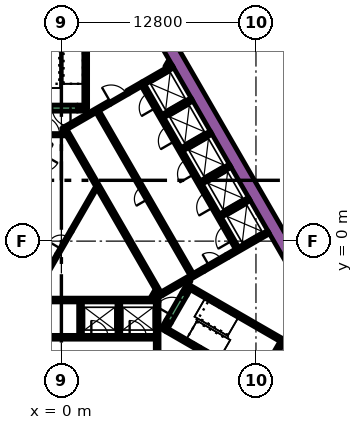
"""IFC4 building model, lengths in metres.
Left out: names, types, materials, properties, quantities, classifications, styles, units other than length and angle.
Written with IfcOpenShell. Run it as: python <this file> out.ifc"""

import sys

from ifc_helpers import new_model, si_unit, direction, frame, frame_2d, origin, place, context, subcontext, project, spatial, polyline, rectangle, outline, extrude, element, fill, save


model = new_model("IFC4")
c1 = context("Model", 3, precision=1e-05, world=origin(), true_north=direction((0.0, 1.0)))
c2 = subcontext(c1, "Body", "Model", "MODEL_VIEW")
j1 = project(units=[si_unit("LENGTHUNIT", "METRE"), si_unit("PLANEANGLEUNIT", "RADIAN")], contexts=[c1])
p1 = place(None, origin())
s1 = spatial("IfcSite", under=j1, at=p1, CompositionType="ELEMENT")
p2 = place(p1, origin())
s2 = spatial("IfcBuilding", under=s1, at=p2, CompositionType="ELEMENT")
p3 = place(p2, origin())
s3 = spatial("IfcBuildingStorey", under=s2, at=p3, CompositionType="ELEMENT", Elevation=0.0)
p4 = place(p3, frame((6.776, 13.364, -1.8), z_axis=(0.0, 0.0, 1.0), x_axis=(0.500004177138, -0.8660229921, 0.0)))
e1 = element("IfcWall", 1, at=p4, inside=s3, PredefinedType="SOLIDWALL", context=c2, shape_type="SweptSolid", body=[
    extrude(rectangle(XDim=20.204, YDim=0.9, at=frame_2d((10.102, 0.0))), origin(), (0.0, 0.0, 1.0), 7.8),
])
p5 = place(p3, frame((11.695, -12.644, -1.8), z_axis=(0.0, 0.0, 1.0), x_axis=(0.500010229568, 0.86601949766, 0.0)))
e2 = element("IfcWall", 2, at=p5, inside=s3, PredefinedType="SOLIDWALL", context=c2, shape_type="SweptSolid", body=[
    extrude(rectangle(XDim=9.326, YDim=0.9, at=frame_2d((4.663, 0.0))), origin(), (0.0, 0.0, 1.0), 7.8),
])
p6 = place(p3, frame((12.885, -9.431, 0.0), z_axis=(0.0, 0.0, 1.0), x_axis=(0.500020560727, 0.866013532718, 0.0)))
e3 = element("IfcWall", 3, at=p6, inside=s3, PredefinedType="SOLIDWALL", context=c2, shape_type="SweptSolid", body=[
    extrude(rectangle(XDim=3.45, YDim=0.25, at=frame_2d((1.725, 0.0))), origin(), (0.0, 0.0, 1.0), 6.0),
])
p7 = place(p3, frame((12.84, -9.261, 0.0), z_axis=(0.0, 0.0, 1.0), x_axis=(-0.866013990052, 0.500019768644, 0.0)))
e4 = element("IfcWall", 4, at=p7, inside=s3, PredefinedType="SOLIDWALL", context=c2, shape_type="SweptSolid", body=[
    extrude(rectangle(XDim=6.8, YDim=0.25, at=frame_2d((3.4, 0.0))), origin(), (0.0, 0.0, 1.0), 6.0),
])
p8 = place(p3, frame((6.78, -5.906, 0.0), z_axis=(0.0, 0.0, 1.0), x_axis=(0.500223362819, 0.865896406789, 0.0)))
e5 = element("IfcWall", 5, at=p8, inside=s3, PredefinedType="SOLIDWALL", context=c2, shape_type="SweptSolid", body=[
    extrude(rectangle(XDim=0.675, YDim=0.25, at=frame_2d((0.337, 0.0))), origin(), (0.0, 0.0, 1.0), 6.0),
])
p9 = place(p3, frame((8.334, -2.964, 0.0), z_axis=(0.0, 0.0, 1.0), x_axis=(0.866016039709, -0.500016218704, 0.0)))
e6 = element("IfcWall", 6, at=p9, inside=s3, PredefinedType="SOLIDWALL", context=c2, shape_type="SweptSolid", body=[
    extrude(rectangle(XDim=7.05, YDim=0.25, at=frame_2d((3.525, 0.0))), origin(), (0.0, 0.0, 1.0), 6.0),
])
p10 = place(p3, frame((8.168, -3.503, 0.0), z_axis=(0.0, 0.0, 1.0), x_axis=(0.49972245349, 0.866185586049, 0.0)))
e7 = element("IfcWall", 7, at=p10, inside=s3, PredefinedType="SOLIDWALL", context=c2, shape_type="SweptSolid", body=[
    extrude(rectangle(XDim=0.425, YDim=0.25, at=frame_2d((0.212, 0.0))), origin(), (0.0, 0.0, 1.0), 6.0),
])
p11 = place(p3, frame((1.6, 8.95, 0.0), z_axis=(0.0, 0.0, 1.0), x_axis=(0.0, 1.0, 0.0)))
e8 = element("IfcWall", 8, at=p11, inside=s3, PredefinedType="SOLIDWALL", context=c2, shape_type="SweptSolid", body=[
    extrude(rectangle(XDim=6.8, YDim=0.25, at=frame_2d((3.4, 0.0))), origin(), (0.0, 0.0, 1.0), 6.0),
])
p12 = place(p3, frame((1.05, 8.825, 0.0), z_axis=(0.0, 0.0, 1.0), x_axis=(1.0, 0.0, 0.0)))
e9 = element("IfcWall", 9, at=p12, inside=s3, PredefinedType="SOLIDWALL", context=c2, shape_type="SweptSolid", body=[
    extrude(rectangle(XDim=0.675, YDim=0.25, at=frame_2d((0.337, 0.0))), origin(), (0.0, 0.0, 1.0), 6.0),
])
p13 = place(p3, frame((-5.845, -3.875, -1.8), z_axis=(0.0, 0.0, 1.0), x_axis=(1.0, 0.0, 0.0)))
e10 = element("IfcWall", 10, at=p13, inside=s3, PredefinedType="SOLIDWALL", context=c2, shape_type="SweptSolid", body=[
    extrude(rectangle(XDim=12.27, YDim=0.25, at=frame_2d((6.135, 0.0))), origin(), (0.0, 0.0, 1.0), 7.8),
])
p14 = place(p3, frame((6.3, -7.268, -1.8), z_axis=(0.0, 0.0, 1.0), x_axis=(0.0, 1.0, 0.0)))
e11 = element("IfcWall", 11, at=p14, inside=s3, PredefinedType="SOLIDWALL", context=c2, shape_type="SweptSolid", body=[
    extrude(rectangle(XDim=3.268, YDim=0.25, at=frame_2d((1.634, 0.0))), origin(), (0.0, 0.0, 1.0), 7.8),
])
for number, where, z_axis, x_axis in (
    (12, (3.78, -4.0, -1.8), (0.0, 0.0, 1.0), (0.0, -1.0, 0.0)),
    (13, (1.26, -4.0, -1.8), (0.0, 0.0, 1.0), (0.0, -1.0, 0.0)),
    (14, (10.464, 1.677, -1.8), (0.0, 0.0, 1.0), (0.866, 0.5, 0.0)),
):
    element("IfcWall", number, at=place(p3, frame(where, z_axis=z_axis, x_axis=x_axis)), inside=s3, PredefinedType="SOLIDWALL", context=c2, shape_type="SweptSolid", body=[
        extrude(rectangle(XDim=2.2, YDim=0.25, at=frame_2d((1.1, 0.0))), origin(), (0.0, 0.0, 1.0), 7.8),
    ])
p15 = place(p3, frame((13.629, 0.594, -1.8), z_axis=(0.0, 0.0, 1.0), x_axis=(-0.86602790099, -0.499995674689, 0.0)))
e15 = element("IfcWall", 15, at=p15, inside=s3, PredefinedType="SOLIDWALL", context=c2, shape_type="SweptSolid", body=[
    extrude(rectangle(XDim=3.146, YDim=0.25, at=frame_2d((1.573, 0.0))), origin(), (0.0, 0.0, 1.0), 7.8),
])
p16 = place(p3, frame((0.0, 0.0, -1.8)))
e16 = element("IfcWall", 16, at=p16, inside=s3, PredefinedType="SOLIDWALL", context=c2, shape_type="SweptSolid", body=[
    extrude(outline(polyline([(0.335, 6.925), (0.335, 7.075), (0.335, 7.075), (0.335, 7.075), (0.245, 7.075), (0.079, 7.363), (0.035, 7.439), (0.252, 7.564), (0.377, 7.348), (6.552, -3.348), (6.677, -3.564), (6.46, -3.689), (4.897, -0.981), (0.332, 6.925), (0.335, 6.925), (0.335, 6.925), (0.335, 6.925)])), origin(), (0.0, 0.0, 1.0), 7.8),
])
p17 = place(p3, frame((4.358, 9.791, -1.8), z_axis=(0.0, 0.0, 1.0), x_axis=(0.866079547155, 0.499906209203, 0.0)))
e17 = element("IfcWall", 17, at=p17, inside=s3, PredefinedType="SOLIDWALL", context=c2, shape_type="SweptSolid", body=[
    extrude(rectangle(XDim=1.15, YDim=0.25, at=frame_2d((0.575, 0.0))), origin(), (0.0, 0.0, 1.0), 7.8),
])
p18 = place(p3, frame((5.356, 10.367, -1.8), z_axis=(0.0, 0.0, 1.0), x_axis=(0.865978535641, 0.50008116922, 0.0)))
e18 = element("IfcWall", 18, at=p18, inside=s3, PredefinedType="SOLIDWALL", context=c2, shape_type="SweptSolid", body=[
    extrude(rectangle(XDim=2.278, YDim=0.25, at=frame_2d((1.139, 0.0))), origin(), (0.0, 0.0, 1.0), 7.8),
])
p19 = place(p3, frame((0.314, 7.456, -1.8), z_axis=(0.0, 0.0, 1.0), x_axis=(0.866013897511, 0.50001992892, 0.0)))
e19 = element("IfcWall", 19, at=p19, inside=s3, PredefinedType="SOLIDWALL", context=c2, shape_type="SweptSolid", body=[
    extrude(rectangle(XDim=3.268, YDim=0.25, at=frame_2d((1.634, 0.0))), origin(), (0.0, 0.0, 1.0), 7.8),
])
p20 = place(p3, frame((6.614, -3.456, -1.8), z_axis=(0.0, 0.0, 1.0), x_axis=(0.86602447079, 0.500001615989, 0.0)))
e20 = element("IfcWall", 20, at=p20, inside=s3, PredefinedType="SOLIDWALL", context=c2, shape_type="SweptSolid", body=[
    extrude(rectangle(XDim=3.154, YDim=0.25, at=frame_2d((1.577, 0.0))), origin(), (0.0, 0.0, 1.0), 7.8),
])
for number, where, z_axis, x_axis in (
    (21, (6.684, 8.224, -1.8), (0.0, 0.0, 1.0), (0.866, 0.5, 0.0)),
    (22, (7.944, 6.041, -1.8), (0.0, 0.0, 1.0), (0.866, 0.5, 0.0)),
    (23, (9.204, 3.859, -1.8), (0.0, 0.0, 1.0), (0.866, 0.5, 0.0)),
):
    element("IfcWall", number, at=place(p3, frame(where, z_axis=z_axis, x_axis=x_axis)), inside=s3, PredefinedType="SOLIDWALL", context=c2, shape_type="SweptSolid", body=[
        extrude(rectangle(XDim=2.2, YDim=0.25, at=frame_2d((1.1, 0.0))), origin(), (0.0, 0.0, 1.0), 7.8),
    ])
p21 = place(p3, frame((6.945, -5.222, 0.0), z_axis=(0.0, 0.0, 1.0), x_axis=(-0.499818422106, -0.866130212453, 0.0)))
e24 = element("IfcWall", 24, at=p21, inside=s3, PredefinedType="PARTITIONING", context=c2, shape_type="SweptSolid", body=[
    extrude(rectangle(XDim=0.514, YDim=0.15, at=frame_2d((0.257, 0.0))), origin(), (0.0, 0.0, 1.0), 5.1),
])
p22 = place(p3, frame((5.936, -3.718, 0.0), z_axis=(0.0, 0.0, 1.0), x_axis=(0.499890179513, 0.866088799389, 0.0)))
e25 = element("IfcWall", 25, at=p22, inside=s3, PredefinedType="PARTITIONING", context=c2, shape_type="SweptSolid", body=[
    extrude(rectangle(XDim=0.504, YDim=0.15, at=frame_2d((0.252, 0.0))), origin(), (0.0, 0.0, 1.0), 5.1),
])
p23 = place(p3, frame((8.459, -2.599, -1.8), z_axis=(0.0, 0.0, 1.0), x_axis=(-0.500041054325, -0.866001699761, 0.0)))
e26 = element("IfcWall", 26, at=p23, inside=s3, PredefinedType="PARTITIONING", context=c2, shape_type="SweptSolid", body=[
    extrude(rectangle(XDim=0.929, YDim=0.15, at=frame_2d((0.464, 0.0))), origin(), (0.0, 0.0, 1.0), 7.8),
])
for number, where, z_axis, x_axis in (
    (27, (-1.887, -3.718, 0.0), (0.0, 0.0, 1.0), (0.5, 0.866, 0.0)),
    (28, (0.645, 0.667, 0.0), (0.0, 0.0, 1.0), (0.5, 0.866, 0.0)),
):
    element("IfcWall", number, at=place(p3, frame(where, z_axis=z_axis, x_axis=x_axis)), inside=s3, PredefinedType="PARTITIONING", context=c2, shape_type="SweptSolid", body=[
        extrude(rectangle(XDim=3.263, YDim=0.15, at=frame_2d((1.632, 0.0))), origin(), (0.0, 0.0, 1.0), 5.1),
    ])
p24 = place(p3, frame((1.05, 8.625, 0.0), z_axis=(0.0, 0.0, 1.0), x_axis=(1.0, 0.0, 0.0)))
e29 = element("IfcWall", 29, at=p24, inside=s3, PredefinedType="PARTITIONING", context=c2, shape_type="SweptSolid", body=[
    extrude(rectangle(XDim=0.514, YDim=0.15, at=frame_2d((0.257, 0.0))), origin(), (0.0, 0.0, 1.0), 5.1),
])
p25 = place(p3, frame((6.872, 11.45, 0.0), z_axis=(0.0, 0.0, 1.0), x_axis=(0.499846793097, 0.866113839764, 0.0)))
e30 = element("IfcWall", 30, at=p25, inside=s3, PredefinedType="PARTITIONING", context=c2, shape_type="SweptSolid", body=[
    extrude(rectangle(XDim=0.453, YDim=0.15, at=frame_2d((0.227, 0.0))), origin(), (0.0, 0.0, 1.0), 5.1),
])
p26 = place(p3, frame((7.131, 11.6, 0.0), z_axis=(0.0, 0.0, 1.0), x_axis=(0.498600033135, 0.866832167699, 0.0)))
e31 = element("IfcWall", 31, at=p26, inside=s3, PredefinedType="PARTITIONING", context=c2, shape_type="SweptSolid", body=[
    extrude(rectangle(XDim=0.107, YDim=0.15, at=frame_2d((0.053, 0.0))), origin(), (0.0, 0.0, 1.0), 5.1),
])
p27 = place(p3, frame((-6.175, -6.325, -1.8), z_axis=(0.0, 0.0, 1.0), x_axis=(1.0, 0.0, 0.0)))
e32 = element("IfcWall", 32, at=p27, inside=s3, PredefinedType="SOLIDWALL", context=c2, shape_type="SweptSolid", body=[
    extrude(rectangle(XDim=12.35, YDim=0.25, at=frame_2d((6.175, 0.0))), origin(), (0.0, 0.0, 1.0), 7.8),
])
p28 = place(p27, frame((3.205, 0.0, 1.8)))
e33 = element("IfcOpeningElement", 33, at=p28, cuts=e32, PredefinedType="OPENING", context=c2, shape_type="SweptSolid", body=[
    extrude(rectangle(XDim=0.9, YDim=2.1, at=frame_2d((0.45, 1.05))), frame((0.0, 0.135, 0.0), z_axis=(0.0, -1.0, 0.0), x_axis=(1.0, 0.0, 0.0)), (0.0, 0.0, 1.0), 0.27),
])
p29 = place(p27, frame((8.145, 0.0, 1.8)))
e34 = element("IfcOpeningElement", 34, at=p29, cuts=e32, PredefinedType="OPENING", context=c2, shape_type="SweptSolid", body=[
    extrude(rectangle(XDim=1.1, YDim=2.1, at=frame_2d((0.55, 1.05))), frame((0.0, 0.135, 0.0), z_axis=(0.0, -1.0, 0.0), x_axis=(1.0, 0.0, 0.0)), (0.0, 0.0, 1.0), 0.27),
])
p30 = place(p27, frame((10.665, 0.0, 1.8)))
e35 = element("IfcOpeningElement", 35, at=p30, cuts=e32, PredefinedType="OPENING", context=c2, shape_type="SweptSolid", body=[
    extrude(rectangle(XDim=1.1, YDim=2.1, at=frame_2d((0.55, 1.05))), frame((0.0, 0.135, 0.0), z_axis=(0.0, -1.0, 0.0), x_axis=(1.0, 0.0, 0.0)), (0.0, 0.0, 1.0), 0.27),
])
p31 = place(p3, frame((11.553, -0.46, -1.8), z_axis=(0.0, 0.0, 1.0), x_axis=(-0.500006514828, 0.866021642414, 0.0)))
e36 = element("IfcWall", 36, at=p31, inside=s3, PredefinedType="SOLIDWALL", context=c2, shape_type="SweptSolid", body=[
    extrude(rectangle(XDim=12.35, YDim=0.25, at=frame_2d((6.175, 0.0))), origin(), (0.0, 0.0, 1.0), 7.8),
])
p32 = place(p31, frame((0.585, 0.0, 1.8)))
e37 = element("IfcOpeningElement", 37, at=p32, cuts=e36, PredefinedType="OPENING", context=c2, shape_type="SweptSolid", body=[
    extrude(rectangle(XDim=1.1, YDim=2.1, at=frame_2d((0.55, 1.05))), frame((0.0, 0.135, 0.0), z_axis=(0.0, -1.0, 0.0), x_axis=(1.0, 0.0, 0.0)), (0.0, 0.0, 1.0), 0.27),
])
p33 = place(p31, frame((3.105, 0.0, 1.8)))
e38 = element("IfcOpeningElement", 38, at=p33, cuts=e36, PredefinedType="OPENING", context=c2, shape_type="SweptSolid", body=[
    extrude(rectangle(XDim=1.1, YDim=2.1, at=frame_2d((0.55, 1.05))), frame((0.0, 0.135, 0.0), z_axis=(0.0, -1.0, 0.0), x_axis=(1.0, 0.0, 0.0)), (0.0, 0.0, 1.0), 0.27),
])
p34 = place(p31, frame((5.625, 0.0, 1.8)))
e39 = element("IfcOpeningElement", 39, at=p34, cuts=e36, PredefinedType="OPENING", context=c2, shape_type="SweptSolid", body=[
    extrude(rectangle(XDim=1.1, YDim=2.1, at=frame_2d((0.55, 1.05))), frame((0.0, 0.135, 0.0), z_axis=(0.0, -1.0, 0.0), x_axis=(1.0, 0.0, 0.0)), (0.0, 0.0, 1.0), 0.27),
])
p35 = place(p31, frame((8.145, 0.0, 1.8)))
e40 = element("IfcOpeningElement", 40, at=p35, cuts=e36, PredefinedType="OPENING", context=c2, shape_type="SweptSolid", body=[
    extrude(rectangle(XDim=1.1, YDim=2.1, at=frame_2d((0.55, 1.05))), frame((0.0, 0.135, 0.0), z_axis=(0.0, -1.0, 0.0), x_axis=(1.0, 0.0, 0.0)), (0.0, 0.0, 1.0), 0.27),
])
p36 = place(p31, frame((10.665, 0.0, 1.8)))
e41 = element("IfcOpeningElement", 41, at=p36, cuts=e36, PredefinedType="OPENING", context=c2, shape_type="SweptSolid", body=[
    extrude(rectangle(XDim=1.1, YDim=2.1, at=frame_2d((0.55, 1.05))), frame((0.0, 0.135, 0.0), z_axis=(0.0, -1.0, 0.0), x_axis=(1.0, 0.0, 0.0)), (0.0, 0.0, 1.0), 0.27),
])
p37 = place(p3, frame((8.565, -2.185, -1.8), z_axis=(0.0, 0.0, 1.0), x_axis=(-0.499997954832, 0.866026584559, 0.0)))
e42 = element("IfcWall", 42, at=p37, inside=s3, PredefinedType="SOLIDWALL", context=c2, shape_type="SweptSolid", body=[
    extrude(rectangle(XDim=12.35, YDim=0.25, at=frame_2d((6.175, 0.0))), origin(), (0.0, 0.0, 1.0), 7.8),
])
p38 = place(p37, frame((5.725, 0.0, 1.8)))
e43 = element("IfcOpeningElement", 43, at=p38, cuts=e42, PredefinedType="OPENING", context=c2, shape_type="SweptSolid", body=[
    extrude(rectangle(XDim=0.9, YDim=2.1, at=frame_2d((0.45, 1.05))), frame((0.0, 0.135, 0.0), z_axis=(0.0, -1.0, 0.0), x_axis=(1.0, 0.0, 0.0)), (0.0, 0.0, 1.0), 0.27),
])
p39 = place(p3, frame((7.053, -5.284, 0.0), z_axis=(0.0, 0.0, 1.0), x_axis=(0.500078061341, 0.865980330357, 0.0)))
e44 = element("IfcWall", 44, at=p39, inside=s3, PredefinedType="SOLIDWALL", context=c2, shape_type="SweptSolid", body=[
    extrude(rectangle(XDim=2.1, YDim=0.4, at=frame_2d((1.05, 0.0))), origin(), (0.0, 0.0, 1.0), 6.0),
])
p40 = place(p39, frame((0.45, 0.0, 0.0)))
e45 = element("IfcOpeningElement", 45, at=p40, cuts=e44, PredefinedType="OPENING", context=c2, shape_type="SweptSolid", body=[
    extrude(rectangle(XDim=1.2, YDim=2.1, at=frame_2d((0.6, 1.05))), frame((0.0, 0.21, 0.0), z_axis=(0.0, -1.0, 0.0), x_axis=(1.0, 0.0, 0.0)), (0.0, 0.0, 1.0), 0.42),
])
p41 = place(p3, frame((9.346, -1.879, -1.8), z_axis=(0.0, 0.0, 1.0), x_axis=(0.866047807691, 0.499961193289, 0.0)))
e46 = element("IfcWall", 46, at=p41, inside=s3, PredefinedType="SOLIDWALL", context=c2, shape_type="SweptSolid", body=[
    extrude(rectangle(XDim=1.8, YDim=0.25, at=frame_2d((0.9, 0.0))), origin(), (0.0, 0.0, 1.0), 7.8),
])
p42 = place(p41, frame((0.45, 0.0, 1.8)))
e47 = element("IfcOpeningElement", 47, at=p42, cuts=e46, PredefinedType="OPENING", context=c2, shape_type="SweptSolid", body=[
    extrude(rectangle(XDim=0.9, YDim=2.1, at=frame_2d((0.45, 1.05))), frame((0.0, 0.135, 0.0), z_axis=(0.0, -1.0, 0.0), x_axis=(1.0, 0.0, 0.0)), (0.0, 0.0, 1.0), 0.27),
])
p43 = place(p3, frame((1.05, 8.75, 0.0), z_axis=(0.0, 0.0, 1.0), x_axis=(-1.0, 0.0, 0.0)))
e48 = element("IfcWall", 48, at=p43, inside=s3, PredefinedType="SOLIDWALL", context=c2, shape_type="SweptSolid", body=[
    extrude(rectangle(XDim=2.1, YDim=0.4, at=frame_2d((1.05, 0.0))), origin(), (0.0, 0.0, 1.0), 6.0),
])
p44 = place(p43, frame((0.45, 0.0, 0.0)))
e49 = element("IfcOpeningElement", 49, at=p44, cuts=e48, PredefinedType="OPENING", context=c2, shape_type="SweptSolid", body=[
    extrude(rectangle(XDim=1.2, YDim=2.1, at=frame_2d((0.6, 1.05))), frame((0.0, 0.21, 0.0), z_axis=(0.0, -1.0, 0.0), x_axis=(1.0, 0.0, 0.0)), (0.0, 0.0, 1.0), 0.42),
])
p45 = place(p3, frame((-1.765, 7.0, 0.0), z_axis=(0.0, 0.0, 1.0), x_axis=(1.0, 0.0, 0.0)))
e50 = element("IfcWall", 50, at=p45, inside=s3, PredefinedType="PARTITIONING", context=c2, shape_type="SweptSolid", body=[
    extrude(rectangle(XDim=2.1, YDim=0.15, at=frame_2d((1.05, 0.0))), origin(), (0.0, 0.0, 1.0), 5.1),
])
p46 = place(p45, frame((0.45, 0.0, 0.0)))
e51 = element("IfcOpeningElement", 51, at=p46, cuts=e50, PredefinedType="OPENING", context=c2, shape_type="SweptSolid", body=[
    extrude(rectangle(XDim=1.2, YDim=2.1, at=frame_2d((0.6, 1.05))), frame((0.0, 0.085, 0.0), z_axis=(0.0, -1.0, 0.0), x_axis=(1.0, 0.0, 0.0)), (0.0, 0.0, 1.0), 0.17),
])
p47 = place(p3, frame((3.183, 9.02, 0.0), z_axis=(0.0, 0.0, 1.0), x_axis=(0.866034573852, 0.49998411664, 0.0)))
e52 = element("IfcWall", 52, at=p47, inside=s3, PredefinedType="PARTITIONING", context=c2, shape_type="SweptSolid", body=[
    extrude(rectangle(XDim=1.4, YDim=0.09, at=frame_2d((0.7, 0.0))), origin(), (0.0, 0.0, 1.0), 5.1),
])
p48 = place(p47, frame((0.1, 0.0, 0.0)))
e53 = element("IfcOpeningElement", 53, at=p48, cuts=e52, PredefinedType="OPENING", context=c2, shape_type="SweptSolid", body=[
    extrude(rectangle(XDim=1.2, YDim=2.1, at=frame_2d((0.6, 1.05))), frame((0.0, 0.055, 0.0), z_axis=(0.0, -1.0, 0.0), x_axis=(1.0, 0.0, 0.0)), (0.0, 0.0, 1.0), 0.11),
])
p49 = place(p3, frame((-0.255, -0.892, 0.0), z_axis=(0.0, 0.0, 1.0), x_axis=(0.500062916607, 0.865989075817, 0.0)))
e54 = element("IfcWall", 54, at=p49, inside=s3, PredefinedType="PARTITIONING", context=c2, shape_type="SweptSolid", body=[
    extrude(rectangle(XDim=1.8, YDim=0.15, at=frame_2d((0.9, 0.0))), origin(), (0.0, 0.0, 1.0), 5.1),
])
p50 = place(p49, frame((0.45, 0.0, 0.0)))
e55 = element("IfcOpeningElement", 55, at=p50, cuts=e54, PredefinedType="OPENING", context=c2, shape_type="SweptSolid", body=[
    extrude(rectangle(XDim=0.9, YDim=2.1, at=frame_2d((0.45, 1.05))), frame((0.0, 0.085, 0.0), z_axis=(0.0, -1.0, 0.0), x_axis=(1.0, 0.0, 0.0)), (0.0, 0.0, 1.0), 0.17),
])
p51 = place(p29, origin())
e56 = element("IfcDoor", 56, at=p51, inside=s3, OperationType="DOUBLE_DOOR_SLIDING", PredefinedType="DOOR", context=c2, shape_type="SweptSolid", body=[
    extrude(rectangle(XDim=1.1, YDim=2.1, at=frame_2d((0.55, 1.05))), frame((0.0, 0.025, 0.0), z_axis=(0.0, -1.0, 0.0), x_axis=(1.0, 0.0, 0.0)), (0.0, 0.0, 1.0), 0.05),
])
fill(e34, e56)
p52 = place(p30, origin())
e57 = element("IfcDoor", 57, at=p52, inside=s3, OperationType="DOUBLE_DOOR_SLIDING", PredefinedType="DOOR", context=c2, shape_type="SweptSolid", body=[
    extrude(rectangle(XDim=1.1, YDim=2.1, at=frame_2d((0.55, 1.05))), frame((0.0, 0.025, 0.0), z_axis=(0.0, -1.0, 0.0), x_axis=(1.0, 0.0, 0.0)), (0.0, 0.0, 1.0), 0.05),
])
fill(e35, e57)
p53 = place(p32, origin())
e58 = element("IfcDoor", 58, at=p53, inside=s3, OperationType="DOUBLE_DOOR_SLIDING", PredefinedType="DOOR", context=c2, shape_type="SweptSolid", body=[
    extrude(rectangle(XDim=1.1, YDim=2.1, at=frame_2d((0.55, 1.05))), frame((0.0, 0.025, 0.0), z_axis=(0.0, -1.0, 0.0), x_axis=(1.0, 0.0, 0.0)), (0.0, 0.0, 1.0), 0.05),
])
fill(e37, e58)
p54 = place(p33, origin())
e59 = element("IfcDoor", 59, at=p54, inside=s3, OperationType="DOUBLE_DOOR_SLIDING", PredefinedType="DOOR", context=c2, shape_type="SweptSolid", body=[
    extrude(rectangle(XDim=1.1, YDim=2.1, at=frame_2d((0.55, 1.05))), frame((0.0, 0.025, 0.0), z_axis=(0.0, -1.0, 0.0), x_axis=(1.0, 0.0, 0.0)), (0.0, 0.0, 1.0), 0.05),
])
fill(e38, e59)
p55 = place(p34, origin())
e60 = element("IfcDoor", 60, at=p55, inside=s3, OperationType="DOUBLE_DOOR_SLIDING", PredefinedType="DOOR", context=c2, shape_type="SweptSolid", body=[
    extrude(rectangle(XDim=1.1, YDim=2.1, at=frame_2d((0.55, 1.05))), frame((0.0, 0.025, 0.0), z_axis=(0.0, -1.0, 0.0), x_axis=(1.0, 0.0, 0.0)), (0.0, 0.0, 1.0), 0.05),
])
fill(e39, e60)
p56 = place(p35, origin())
e61 = element("IfcDoor", 61, at=p56, inside=s3, OperationType="DOUBLE_DOOR_SLIDING", PredefinedType="DOOR", context=c2, shape_type="SweptSolid", body=[
    extrude(rectangle(XDim=1.1, YDim=2.1, at=frame_2d((0.55, 1.05))), frame((0.0, 0.025, 0.0), z_axis=(0.0, -1.0, 0.0), x_axis=(1.0, 0.0, 0.0)), (0.0, 0.0, 1.0), 0.05),
])
fill(e40, e61)
p57 = place(p36, origin())
e62 = element("IfcDoor", 62, at=p57, inside=s3, OperationType="DOUBLE_DOOR_SLIDING", PredefinedType="DOOR", context=c2, shape_type="SweptSolid", body=[
    extrude(rectangle(XDim=1.1, YDim=2.1, at=frame_2d((0.55, 1.05))), frame((0.0, 0.025, 0.0), z_axis=(0.0, -1.0, 0.0), x_axis=(1.0, 0.0, 0.0)), (0.0, 0.0, 1.0), 0.05),
])
fill(e41, e62)
p58 = place(p38, origin())
e63 = element("IfcDoor", 63, at=p58, inside=s3, OperationType="SINGLE_SWING_LEFT", PredefinedType="DOOR", context=c2, shape_type="SweptSolid", body=[
    extrude(rectangle(XDim=0.9, YDim=2.1, at=frame_2d((0.45, 1.05))), frame((0.0, 0.025, 0.0), z_axis=(0.0, -1.0, 0.0), x_axis=(1.0, 0.0, 0.0)), (0.0, 0.0, 1.0), 0.05),
])
fill(e43, e63)
p59 = place(p40, origin())
e64 = element("IfcDoor", 64, at=p59, inside=s3, OperationType="SINGLE_SWING_LEFT", PredefinedType="DOOR", context=c2, shape_type="SweptSolid", body=[
    extrude(rectangle(XDim=1.2, YDim=2.1, at=frame_2d((0.6, 1.05))), frame((0.0, 0.025, 0.0), z_axis=(0.0, -1.0, 0.0), x_axis=(1.0, 0.0, 0.0)), (0.0, 0.0, 1.0), 0.05),
])
fill(e45, e64)
p60 = place(p42, origin())
e65 = element("IfcDoor", 65, at=p60, inside=s3, OperationType="SINGLE_SWING_LEFT", PredefinedType="DOOR", context=c2, shape_type="SweptSolid", body=[
    extrude(rectangle(XDim=0.9, YDim=2.1, at=frame_2d((0.45, 1.05))), frame((0.0, 0.025, 0.0), z_axis=(0.0, -1.0, 0.0), x_axis=(1.0, 0.0, 0.0)), (0.0, 0.0, 1.0), 0.05),
])
fill(e47, e65)
p61 = place(p44, origin())
e66 = element("IfcDoor", 66, at=p61, inside=s3, OperationType="SINGLE_SWING_LEFT", PredefinedType="DOOR", context=c2, shape_type="SweptSolid", body=[
    extrude(rectangle(XDim=1.2, YDim=2.1, at=frame_2d((0.6, 1.05))), frame((0.0, 0.025, 0.0), z_axis=(0.0, -1.0, 0.0), x_axis=(1.0, 0.0, 0.0)), (0.0, 0.0, 1.0), 0.05),
])
fill(e49, e66)
p62 = place(p46, origin())
e67 = element("IfcDoor", 67, at=p62, inside=s3, OperationType="SINGLE_SWING_LEFT", PredefinedType="DOOR", context=c2, shape_type="SweptSolid", body=[
    extrude(rectangle(XDim=1.2, YDim=2.1, at=frame_2d((0.6, 1.05))), frame((0.0, 0.025, 0.0), z_axis=(0.0, -1.0, 0.0), x_axis=(1.0, 0.0, 0.0)), (0.0, 0.0, 1.0), 0.05),
])
fill(e51, e67)
p63 = place(p48, origin())
e68 = element("IfcDoor", 68, at=p63, inside=s3, OperationType="SINGLE_SWING_LEFT", PredefinedType="DOOR", context=c2, shape_type="SweptSolid", body=[
    extrude(rectangle(XDim=1.2, YDim=2.1, at=frame_2d((0.6, 1.05))), frame((0.0, 0.025, 0.0), z_axis=(0.0, -1.0, 0.0), x_axis=(1.0, 0.0, 0.0)), (0.0, 0.0, 1.0), 0.05),
])
fill(e53, e68)
p64 = place(p50, origin())
e69 = element("IfcDoor", 69, at=p64, inside=s3, OperationType="SINGLE_SWING_LEFT", PredefinedType="DOOR", context=c2, shape_type="SweptSolid", body=[
    extrude(rectangle(XDim=0.9, YDim=2.1, at=frame_2d((0.45, 1.05))), frame((0.0, 0.025, 0.0), z_axis=(0.0, -1.0, 0.0), x_axis=(1.0, 0.0, 0.0)), (0.0, 0.0, 1.0), 0.05),
])
fill(e55, e69)
save(model, sys.argv[1])
